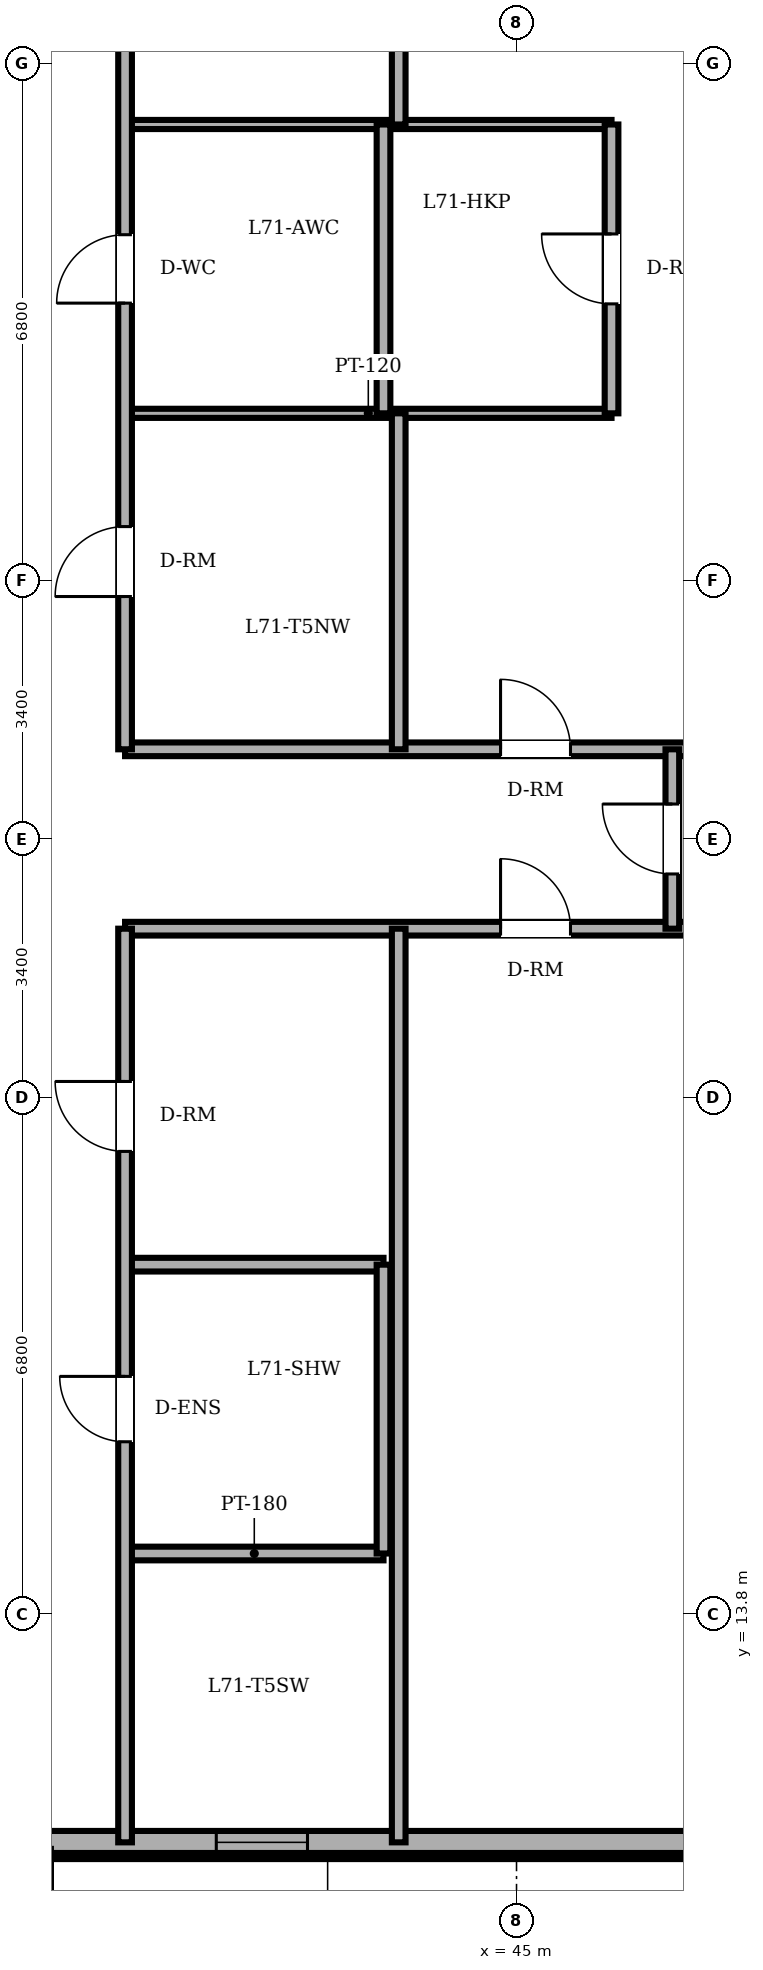
"""IFC4 building model, lengths in metres.
Left out: names, types, materials, properties, quantities, classifications, styles, units other than length and angle.
Written with IfcOpenShell. Run it as: python <this file> out.ifc"""

import sys

from ifc_helpers import new_model, si_unit, direction, frame, frame_2d, origin, place, context, subcontext, project, spatial, rectangle, extrude, element, fill, save


model = new_model("IFC4")
c1 = context("Model", 3, precision=1e-05, world=origin(), true_north=direction((0.0, 1.0)))
c2 = subcontext(c1, "Body", "Model", "MODEL_VIEW")
j1 = project(units=[si_unit("LENGTHUNIT", "METRE"), si_unit("PLANEANGLEUNIT", "RADIAN")], contexts=[c1])
p1 = place(None, origin())
s1 = spatial("IfcSite", under=j1, at=p1, CompositionType="ELEMENT")
p2 = place(p1, origin())
s2 = spatial("IfcBuilding", under=s1, at=p2, CompositionType="ELEMENT")
p3 = place(p2, frame((0.0, 0.0, 273.4)))
s3 = spatial("IfcBuildingStorey", under=s2, at=p3, CompositionType="ELEMENT", Elevation=273.4)
p4 = place(p3, frame((24.0, 10.8, 0.0), z_axis=(0.0, 0.0, 1.0), x_axis=(1.0, 0.0, 0.0)))
e1 = element("IfcWall", 1, at=p4, inside=s3, PredefinedType="SOLIDWALL", context=c2, shape_type="SweptSolid", body=[
    extrude(rectangle(XDim=37.03, YDim=0.3, at=frame_2d((18.515, 0.0))), origin(), (0.0, 0.0, 1.0), 3.45),
])
p5 = place(p4, frame((5.05, 0.0, 0.0)))
e2 = element("IfcOpeningElement", 2, at=p5, cuts=e1, PredefinedType="OPENING", context=c2, shape_type="SweptSolid", body=[
    extrude(rectangle(XDim=0.95, YDim=2.2, at=frame_2d((0.475, 1.1))), frame((0.0, 0.16, 0.0), z_axis=(0.0, -1.0, 0.0), x_axis=(1.0, 0.0, 0.0)), (0.0, 0.0, 1.0), 0.32),
])
p6 = place(p4, frame((10.083, 0.0, 0.85)))
e3 = element("IfcOpeningElement", 3, at=p6, cuts=e1, PredefinedType="OPENING", context=c2, shape_type="SweptSolid", body=[
    extrude(rectangle(XDim=1.2, YDim=1.6, at=frame_2d((0.6, 0.8))), frame((0.0, 0.16, 0.0), z_axis=(0.0, -1.0, 0.0), x_axis=(1.0, 0.0, 0.0)), (0.0, 0.0, 1.0), 0.32),
])
p7 = place(p4, frame((17.05, 0.0, 0.85)))
e4 = element("IfcOpeningElement", 4, at=p7, cuts=e1, PredefinedType="OPENING", context=c2, shape_type="SweptSolid", body=[
    extrude(rectangle(XDim=1.2, YDim=1.6, at=frame_2d((0.6, 0.8))), frame((0.0, 0.16, 0.0), z_axis=(0.0, -1.0, 0.0), x_axis=(1.0, 0.0, 0.0)), (0.0, 0.0, 1.0), 0.32),
])
p8 = place(p4, frame((24.593, 0.0, 0.85)))
e5 = element("IfcOpeningElement", 5, at=p8, cuts=e1, PredefinedType="OPENING", context=c2, shape_type="SweptSolid", body=[
    extrude(rectangle(XDim=1.2, YDim=1.6, at=frame_2d((0.6, 0.8))), frame((0.0, 0.16, 0.0), z_axis=(0.0, -1.0, 0.0), x_axis=(1.0, 0.0, 0.0)), (0.0, 0.0, 1.0), 0.32),
])
p9 = place(p4, frame((30.337, 0.0, 0.85)))
e6 = element("IfcOpeningElement", 6, at=p9, cuts=e1, PredefinedType="OPENING", context=c2, shape_type="SweptSolid", body=[
    extrude(rectangle(XDim=1.2, YDim=1.6, at=frame_2d((0.6, 0.8))), frame((0.0, 0.16, 0.0), z_axis=(0.0, -1.0, 0.0), x_axis=(1.0, 0.0, 0.0)), (0.0, 0.0, 1.0), 0.32),
])
p10 = place(p3, frame((39.85, 14.6, 0.0), z_axis=(0.0, 0.0, 1.0), x_axis=(1.0, 0.0, 0.0)))
e7 = element("IfcWall", 7, at=p10, inside=s3, PredefinedType="PARTITIONING", context=c2, shape_type="SweptSolid", body=[
    extrude(rectangle(XDim=3.4, YDim=0.18, at=frame_2d((1.7, 0.0))), origin(), (0.0, 0.0, 1.0), 3.092),
])
p11 = place(p3, frame((39.85, 18.4, 0.0), z_axis=(0.0, 0.0, 1.0), x_axis=(1.0, 0.0, 0.0)))
e8 = element("IfcWall", 8, at=p11, inside=s3, PredefinedType="PARTITIONING", context=c2, shape_type="SweptSolid", body=[
    extrude(rectangle(XDim=3.4, YDim=0.18, at=frame_2d((1.7, 0.0))), origin(), (0.0, 0.0, 1.0), 3.45),
])
p12 = place(p3, frame((39.85, 22.82, 0.0), z_axis=(0.0, 0.0, 1.0), x_axis=(1.0, 0.0, 0.0)))
e9 = element("IfcWall", 9, at=p12, inside=s3, PredefinedType="PARTITIONING", context=c2, shape_type="SweptSolid", body=[
    extrude(rectangle(XDim=35.75, YDim=0.18, at=frame_2d((17.875, 0.0))), origin(), (0.0, 0.0, 1.0), 3.45),
])
p13 = place(p12, frame((4.94, 0.0, 0.0)))
e10 = element("IfcOpeningElement", 10, at=p13, cuts=e9, PredefinedType="OPENING", context=c2, shape_type="SweptSolid", body=[
    extrude(rectangle(XDim=0.92, YDim=2.1, at=frame_2d((0.46, 1.05))), frame((0.0, 0.1, 0.0), z_axis=(0.0, -1.0, 0.0), x_axis=(1.0, 0.0, 0.0)), (0.0, 0.0, 1.0), 0.2),
])
p14 = place(p3, frame((39.85, 25.18, 0.0), z_axis=(0.0, 0.0, 1.0), x_axis=(1.0, 0.0, 0.0)))
e11 = element("IfcWall", 11, at=p14, inside=s3, PredefinedType="PARTITIONING", context=c2, shape_type="SweptSolid", body=[
    extrude(rectangle(XDim=35.75, YDim=0.18, at=frame_2d((17.875, 0.0))), origin(), (0.0, 0.0, 1.0), 3.45),
])
p15 = place(p14, frame((4.94, 0.0, 0.0)))
e12 = element("IfcOpeningElement", 12, at=p15, cuts=e11, PredefinedType="OPENING", context=c2, shape_type="SweptSolid", body=[
    extrude(rectangle(XDim=0.92, YDim=2.1, at=frame_2d((0.46, 1.05))), frame((0.0, 0.1, 0.0), z_axis=(0.0, -1.0, 0.0), x_axis=(1.0, 0.0, 0.0)), (0.0, 0.0, 1.0), 0.2),
])
p16 = place(p3, frame((39.85, 29.6, 0.0), z_axis=(0.0, 0.0, 1.0), x_axis=(1.0, 0.0, 0.0)))
e13 = element("IfcWall", 13, at=p16, inside=s3, PredefinedType="PARTITIONING", context=c2, shape_type="SweptSolid", body=[
    extrude(rectangle(XDim=6.4, YDim=0.12, at=frame_2d((3.2, 0.0))), origin(), (0.0, 0.0, 1.0), 3.45),
])
p17 = place(p3, frame((39.85, 33.4, 0.0), z_axis=(0.0, 0.0, 1.0), x_axis=(1.0, 0.0, 0.0)))
e14 = element("IfcWall", 14, at=p17, inside=s3, PredefinedType="PARTITIONING", context=c2, shape_type="SweptSolid", body=[
    extrude(rectangle(XDim=6.4, YDim=0.12, at=frame_2d((3.2, 0.0))), origin(), (0.0, 0.0, 1.0), 3.092),
])
p18 = place(p3, frame((39.85, 10.8, 0.0), z_axis=(0.0, 0.0, 1.0), x_axis=(0.0, 1.0, 0.0)))
e15 = element("IfcWall", 15, at=p18, inside=s3, PredefinedType="PARTITIONING", context=c2, shape_type="SweptSolid", body=[
    extrude(rectangle(XDim=12.02, YDim=0.18, at=frame_2d((6.01, 0.0))), origin(), (0.0, 0.0, 1.0), 3.45),
])
p19 = place(p18, frame((5.27, 0.0, 0.0)))
e16 = element("IfcOpeningElement", 16, at=p19, cuts=e15, PredefinedType="OPENING", context=c2, shape_type="SweptSolid", body=[
    extrude(rectangle(XDim=0.86, YDim=2.1, at=frame_2d((0.43, 1.05))), frame((0.0, 0.1, 0.0), z_axis=(0.0, -1.0, 0.0), x_axis=(1.0, 0.0, 0.0)), (0.0, 0.0, 1.0), 0.2),
])
p20 = place(p18, frame((9.09, 0.0, 0.0)))
e17 = element("IfcOpeningElement", 17, at=p20, cuts=e15, PredefinedType="OPENING", context=c2, shape_type="SweptSolid", body=[
    extrude(rectangle(XDim=0.92, YDim=2.1, at=frame_2d((0.46, 1.05))), frame((0.0, 0.1, 0.0), z_axis=(0.0, -1.0, 0.0), x_axis=(1.0, 0.0, 0.0)), (0.0, 0.0, 1.0), 0.2),
])
p21 = place(p3, frame((39.85, 25.18, 0.0), z_axis=(0.0, 0.0, 1.0), x_axis=(0.0, 1.0, 0.0)))
e18 = element("IfcWall", 18, at=p21, inside=s3, PredefinedType="PARTITIONING", context=c2, shape_type="SweptSolid", body=[
    extrude(rectangle(XDim=12.02, YDim=0.18, at=frame_2d((6.01, 0.0))), origin(), (0.0, 0.0, 1.0), 3.45),
])
p22 = place(p21, frame((5.87, 0.0, 0.0)))
e19 = element("IfcOpeningElement", 19, at=p22, cuts=e18, PredefinedType="OPENING", context=c2, shape_type="SweptSolid", body=[
    extrude(rectangle(XDim=0.9, YDim=2.1, at=frame_2d((0.45, 1.05))), frame((0.0, 0.1, 0.0), z_axis=(0.0, -1.0, 0.0), x_axis=(1.0, 0.0, 0.0)), (0.0, 0.0, 1.0), 0.2),
])
p23 = place(p21, frame((2.01, 0.0, 0.0)))
e20 = element("IfcOpeningElement", 20, at=p23, cuts=e18, PredefinedType="OPENING", context=c2, shape_type="SweptSolid", body=[
    extrude(rectangle(XDim=0.92, YDim=2.1, at=frame_2d((0.46, 1.05))), frame((0.0, 0.1, 0.0), z_axis=(0.0, -1.0, 0.0), x_axis=(1.0, 0.0, 0.0)), (0.0, 0.0, 1.0), 0.2),
])
for number, where, z_axis, x_axis in (
    (21, (43.25, 14.6, 0.0), (0.0, 0.0, 1.0), (0.0, 1.0, 0.0)),
    (22, (43.25, 29.6, 0.0), (0.0, 0.0, 1.0), (0.0, 1.0, 0.0)),
):
    element("IfcWall", number, at=place(p3, frame(where, z_axis=z_axis, x_axis=x_axis)), inside=s3, PredefinedType="PARTITIONING", context=c2, shape_type="SweptSolid", body=[
        extrude(rectangle(XDim=3.8, YDim=0.18, at=frame_2d((1.9, 0.0))), origin(), (0.0, 0.0, 1.0), 3.45),
    ])
p24 = place(p3, frame((43.45, 10.8, 0.0), z_axis=(0.0, 0.0, 1.0), x_axis=(0.0, 1.0, 0.0)))
e23 = element("IfcWall", 23, at=p24, inside=s3, PredefinedType="PARTITIONING", context=c2, shape_type="SweptSolid", body=[
    extrude(rectangle(XDim=12.02, YDim=0.18, at=frame_2d((6.01, 0.0))), origin(), (0.0, 0.0, 1.0), 3.45),
])
p25 = place(p3, frame((43.45, 25.18, 0.0), z_axis=(0.0, 0.0, 1.0), x_axis=(0.0, 1.0, 0.0)))
e24 = element("IfcWall", 24, at=p25, inside=s3, PredefinedType="PARTITIONING", context=c2, shape_type="SweptSolid", body=[
    extrude(rectangle(XDim=4.42, YDim=0.18, at=frame_2d((2.21, 0.0))), origin(), (0.0, 0.0, 1.0), 3.45),
])
p26 = place(p3, frame((43.45, 33.4, 0.0), z_axis=(0.0, 0.0, 1.0), x_axis=(0.0, 1.0, 0.0)))
e25 = element("IfcWall", 25, at=p26, inside=s3, PredefinedType="PARTITIONING", context=c2, shape_type="SweptSolid", body=[
    extrude(rectangle(XDim=3.8, YDim=0.18, at=frame_2d((1.9, 0.0))), origin(), (0.0, 0.0, 1.0), 3.45),
])
p27 = place(p3, frame((46.25, 29.6, 0.0), z_axis=(0.0, 0.0, 1.0), x_axis=(0.0, 1.0, 0.0)))
e26 = element("IfcWall", 26, at=p27, inside=s3, PredefinedType="PARTITIONING", context=c2, shape_type="SweptSolid", body=[
    extrude(rectangle(XDim=3.8, YDim=0.18, at=frame_2d((1.9, 0.0))), origin(), (0.0, 0.0, 1.0), 3.45),
])
p28 = place(p27, frame((1.44, 0.0, 0.0)))
e27 = element("IfcOpeningElement", 27, at=p28, cuts=e26, PredefinedType="OPENING", context=c2, shape_type="SweptSolid", body=[
    extrude(rectangle(XDim=0.92, YDim=2.1, at=frame_2d((0.46, 1.05))), frame((0.0, 0.1, 0.0), z_axis=(0.0, -1.0, 0.0), x_axis=(1.0, 0.0, 0.0)), (0.0, 0.0, 1.0), 0.2),
])
p29 = place(p3, frame((47.05, 22.82, 0.0), z_axis=(0.0, 0.0, 1.0), x_axis=(0.0, 1.0, 0.0)))
e28 = element("IfcWall", 28, at=p29, inside=s3, PredefinedType="PARTITIONING", context=c2, shape_type="SweptSolid", body=[
    extrude(rectangle(XDim=2.36, YDim=0.18, at=frame_2d((1.18, 0.0))), origin(), (0.0, 0.0, 1.0), 3.45),
])
p30 = place(p29, frame((0.72, 0.0, 0.0)))
e29 = element("IfcOpeningElement", 29, at=p30, cuts=e28, PredefinedType="OPENING", context=c2, shape_type="SweptSolid", body=[
    extrude(rectangle(XDim=0.92, YDim=2.1, at=frame_2d((0.46, 1.05))), frame((0.0, 0.1, 0.0), z_axis=(0.0, -1.0, 0.0), x_axis=(1.0, 0.0, 0.0)), (0.0, 0.0, 1.0), 0.2),
])
p31 = place(p7, origin())
e30 = element("IfcWindow", 30, at=p31, inside=s3, PartitioningType="SINGLE_PANEL", PredefinedType="WINDOW", context=c2, shape_type="SweptSolid", body=[
    extrude(rectangle(XDim=1.2, YDim=1.6, at=frame_2d((0.6, 0.8))), frame((0.0, 0.03, 0.0), z_axis=(0.0, -1.0, 0.0), x_axis=(1.0, 0.0, 0.0)), (0.0, 0.0, 1.0), 0.06),
])
fill(e4, e30)
p32 = place(p22, origin())
e31 = element("IfcDoor", 31, at=p32, inside=s3, OperationType="SINGLE_SWING_LEFT", PredefinedType="DOOR", context=c2, shape_type="SweptSolid", body=[
    extrude(rectangle(XDim=0.9, YDim=2.1, at=frame_2d((0.45, 1.05))), frame((0.0, 0.025, 0.0), z_axis=(0.0, -1.0, 0.0), x_axis=(1.0, 0.0, 0.0)), (0.0, 0.0, 1.0), 0.05),
])
fill(e19, e31)
p33 = place(p19, origin())
e32 = element("IfcDoor", 32, at=p33, inside=s3, OperationType="SINGLE_SWING_RIGHT", PredefinedType="DOOR", context=c2, shape_type="SweptSolid", body=[
    extrude(rectangle(XDim=0.86, YDim=2.1, at=frame_2d((0.43, 1.05))), frame((0.0, 0.025, 0.0), z_axis=(0.0, -1.0, 0.0), x_axis=(1.0, 0.0, 0.0)), (0.0, 0.0, 1.0), 0.05),
])
fill(e16, e32)
p34 = place(p23, origin())
e33 = element("IfcDoor", 33, at=p34, inside=s3, OperationType="SINGLE_SWING_LEFT", PredefinedType="DOOR", context=c2, shape_type="SweptSolid", body=[
    extrude(rectangle(XDim=0.92, YDim=2.1, at=frame_2d((0.46, 1.05))), frame((0.0, 0.025, 0.0), z_axis=(0.0, -1.0, 0.0), x_axis=(1.0, 0.0, 0.0)), (0.0, 0.0, 1.0), 0.05),
])
fill(e20, e33)
p35 = place(p20, origin())
e34 = element("IfcDoor", 34, at=p35, inside=s3, OperationType="SINGLE_SWING_RIGHT", PredefinedType="DOOR", context=c2, shape_type="SweptSolid", body=[
    extrude(rectangle(XDim=0.92, YDim=2.1, at=frame_2d((0.46, 1.05))), frame((0.0, 0.025, 0.0), z_axis=(0.0, -1.0, 0.0), x_axis=(1.0, 0.0, 0.0)), (0.0, 0.0, 1.0), 0.05),
])
fill(e17, e34)
p36 = place(p15, origin())
e35 = element("IfcDoor", 35, at=p36, inside=s3, OperationType="SINGLE_SWING_LEFT", PredefinedType="DOOR", context=c2, shape_type="SweptSolid", body=[
    extrude(rectangle(XDim=0.92, YDim=2.1, at=frame_2d((0.46, 1.05))), frame((0.0, 0.025, 0.0), z_axis=(0.0, -1.0, 0.0), x_axis=(1.0, 0.0, 0.0)), (0.0, 0.0, 1.0), 0.05),
])
fill(e12, e35)
p37 = place(p30, origin())
e36 = element("IfcDoor", 36, at=p37, inside=s3, OperationType="SINGLE_SWING_RIGHT", PredefinedType="DOOR", context=c2, shape_type="SweptSolid", body=[
    extrude(rectangle(XDim=0.92, YDim=2.1, at=frame_2d((0.46, 1.05))), frame((0.0, 0.025, 0.0), z_axis=(0.0, -1.0, 0.0), x_axis=(1.0, 0.0, 0.0)), (0.0, 0.0, 1.0), 0.05),
])
fill(e29, e36)
p38 = place(p13, origin())
e37 = element("IfcDoor", 37, at=p38, inside=s3, OperationType="SINGLE_SWING_LEFT", PredefinedType="DOOR", context=c2, shape_type="SweptSolid", body=[
    extrude(rectangle(XDim=0.92, YDim=2.1, at=frame_2d((0.46, 1.05))), frame((0.0, 0.025, 0.0), z_axis=(0.0, -1.0, 0.0), x_axis=(1.0, 0.0, 0.0)), (0.0, 0.0, 1.0), 0.05),
])
fill(e10, e37)
p39 = place(p28, origin())
e38 = element("IfcDoor", 38, at=p39, inside=s3, OperationType="SINGLE_SWING_RIGHT", PredefinedType="DOOR", context=c2, shape_type="SweptSolid", body=[
    extrude(rectangle(XDim=0.92, YDim=2.1, at=frame_2d((0.46, 1.05))), frame((0.0, 0.025, 0.0), z_axis=(0.0, -1.0, 0.0), x_axis=(1.0, 0.0, 0.0)), (0.0, 0.0, 1.0), 0.05),
])
fill(e27, e38)
save(model, sys.argv[1])
